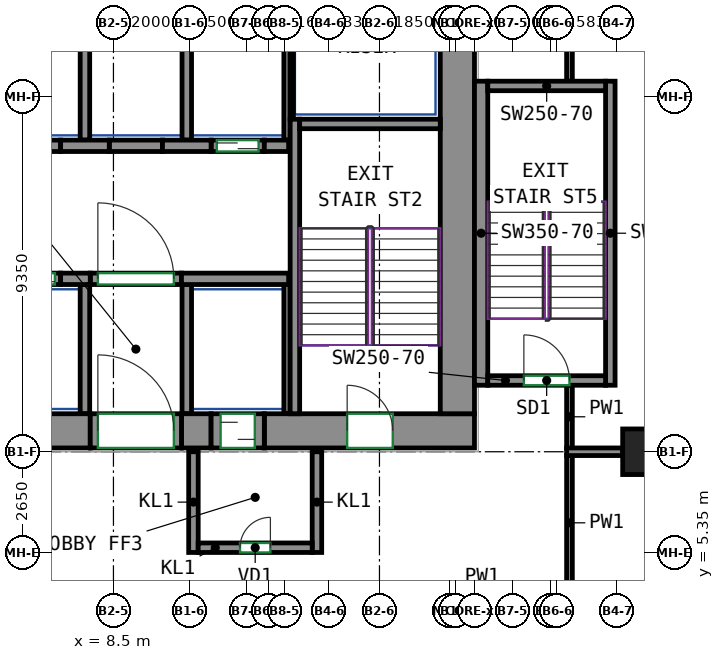
"""IFC4 building model, lengths in metres.
Left out: names, types, materials, properties, quantities, classifications, styles, units other than length and angle.
Written with IfcOpenShell. Run it as: python <this file> out.ifc"""

import sys

from ifc_helpers import new_model, si_unit, direction, frame, frame_2d, origin, origin_2d, place, context, subcontext, project, spatial, rectangle, extrude, source, transform, mapped, element, fill, save


model = new_model("IFC4")
c1 = context("Model", 3, precision=1e-05, world=origin(), true_north=direction((0.0, 1.0)))
c2 = subcontext(c1, "Body", "Model", "MODEL_VIEW")
j1 = project(units=[si_unit("LENGTHUNIT", "METRE"), si_unit("PLANEANGLEUNIT", "RADIAN")], contexts=[c1])
p1 = place(None, origin())
s1 = spatial("IfcSite", under=j1, at=p1, CompositionType="ELEMENT")
p2 = place(p1, origin())
s2 = spatial("IfcBuilding", under=s1, at=p2, CompositionType="ELEMENT")
p3 = place(p2, frame((0.0, 0.0, 104.6)))
s3 = spatial("IfcBuildingStorey", under=s2, at=p3, CompositionType="ELEMENT", Elevation=104.6)
m1 = source(origin(), c2, "Body", "SweptSolid", [
    extrude(rectangle(XDim=1.2, YDim=1.2, at=origin_2d()), origin(), (0.0, 0.0, 1.0), 3.72),
])
p4 = place(p3, frame((22.5, 8.0, 0.0), z_axis=(0.0, 0.0, 1.0), x_axis=(1.0, 0.0, 0.0)))
e1 = element("IfcColumn", 1, at=p4, inside=s3, PredefinedType="COLUMN", context=c2, shape_type="MappedRepresentation", body=[
    mapped(m1, transform((0.0, 0.0, 0.0))),
])
m2 = source(origin(), c2, "Body", "SweptSolid", [
    extrude(rectangle(XDim=14.18, YDim=0.9, at=frame_2d((7.09, 0.0))), origin(), (0.0, 0.0, 1.0), 3.72),
])
p5 = place(p3, frame((-6.29, 8.55, 0.0), z_axis=(0.0, 0.0, 1.0), x_axis=(1.0, 0.0, 0.0)))
e2 = element("IfcWall", 2, at=p5, inside=s3, PredefinedType="SHEAR", context=c2, shape_type="MappedRepresentation", body=[
    mapped(m2, transform((0.0, 0.0, 0.0))),
])
m3 = source(origin(), c2, "Body", "SweptSolid", [
    extrude(rectangle(XDim=0.78, YDim=0.9, at=frame_2d((0.39, 0.0))), origin(), (0.0, 0.0, 1.0), 3.72),
])
p6 = place(p3, frame((10.29, 8.55, 0.0), z_axis=(0.0, 0.0, 1.0), x_axis=(1.0, 0.0, 0.0)))
e3 = element("IfcWall", 3, at=p6, inside=s3, PredefinedType="SHEAR", context=c2, shape_type="MappedRepresentation", body=[
    mapped(m3, transform((0.0, 0.0, 0.0))),
])
m4 = source(origin(), c2, "Body", "SweptSolid", [
    extrude(rectangle(XDim=5.53, YDim=0.9, at=frame_2d((2.765, 0.0))), origin(), (0.0, 0.0, 1.0), 3.72),
])
p7 = place(p3, frame((12.47, 8.55, 0.0), z_axis=(0.0, 0.0, 1.0), x_axis=(1.0, 0.0, 0.0)))
e4 = element("IfcWall", 4, at=p7, inside=s3, PredefinedType="SHEAR", context=c2, shape_type="MappedRepresentation", body=[
    mapped(m4, transform((0.0, 0.0, 0.0))),
])
p8 = place(p7, frame((2.18, 0.0, 0.0)))
e5 = element("IfcOpeningElement", 5, at=p8, cuts=e4, PredefinedType="OPENING", context=c2, shape_type="SweptSolid", body=[
    extrude(rectangle(XDim=1.2, YDim=2.1, at=frame_2d((0.6, 1.05))), frame((0.0, 0.46, 0.0), z_axis=(0.0, -1.0, 0.0), x_axis=(1.0, 0.0, 0.0)), (0.0, 0.0, 1.0), 0.92),
])
m5 = source(origin(), c2, "Body", "SweptSolid", [
    extrude(rectangle(XDim=12.0, YDim=0.9, at=frame_2d((6.0, 0.0))), origin(), (0.0, 0.0, 1.0), 3.72),
])
p9 = place(p3, frame((17.55, 9.0, 0.0), z_axis=(0.0, 0.0, 1.0), x_axis=(0.0, 1.0, 0.0)))
e6 = element("IfcWall", 6, at=p9, inside=s3, PredefinedType="SHEAR", context=c2, shape_type="MappedRepresentation", body=[
    mapped(m5, transform((0.0, 0.0, 0.0))),
])
m6 = source(origin(), c2, "Body", "SweptSolid", [
    extrude(rectangle(XDim=7.75, YDim=0.25, at=frame_2d((3.875, 0.0))), origin(), (0.0, 0.0, 1.0), 3.72),
])
p10 = place(p3, frame((13.275, 9.0, 0.0), z_axis=(0.0, 0.0, 1.0), x_axis=(0.0, 1.0, 0.0)))
e7 = element("IfcWall", 7, at=p10, inside=s3, PredefinedType="SHEAR", context=c2, shape_type="MappedRepresentation", body=[
    mapped(m6, transform((0.0, 0.0, 0.0))),
])
m7 = source(origin(), c2, "Body", "SweptSolid", [
    extrude(rectangle(XDim=3.7, YDim=0.25, at=frame_2d((1.85, 0.0))), origin(), (0.0, 0.0, 1.0), 3.72),
])
p11 = place(p3, frame((13.4, 16.625, 0.0), z_axis=(0.0, 0.0, 1.0), x_axis=(1.0, 0.0, 0.0)))
e8 = element("IfcWall", 8, at=p11, inside=s3, PredefinedType="SHEAR", context=c2, shape_type="MappedRepresentation", body=[
    mapped(m7, transform((0.0, 0.0, 0.0))),
])
m8 = source(origin(), c2, "Body", "SweptSolid", [
    extrude(rectangle(XDim=8.0, YDim=0.35, at=frame_2d((4.0, 0.0))), origin(), (0.0, 0.0, 1.0), 3.72),
])
p12 = place(p3, frame((18.175, 9.75, 0.0), z_axis=(0.0, 0.0, 1.0), x_axis=(0.0, 1.0, 0.0)))
e9 = element("IfcWall", 9, at=p12, inside=s3, PredefinedType="SHEAR", context=c2, shape_type="MappedRepresentation", body=[
    mapped(m8, transform((0.0, 0.0, 0.0))),
])
m9 = source(origin(), c2, "Body", "SweptSolid", [
    extrude(rectangle(XDim=8.0, YDim=0.25, at=frame_2d((4.0, 0.0))), origin(), (0.0, 0.0, 1.0), 3.72),
])
p13 = place(p3, frame((21.575, 9.75, 0.0), z_axis=(0.0, 0.0, 1.0), x_axis=(0.0, 1.0, 0.0)))
e10 = element("IfcWall", 10, at=p13, inside=s3, PredefinedType="SHEAR", context=c2, shape_type="MappedRepresentation", body=[
    mapped(m9, transform((0.0, 0.0, 0.0))),
])
m10 = source(origin(), c2, "Body", "SweptSolid", [
    extrude(rectangle(XDim=3.1, YDim=0.25, at=frame_2d((1.55, 0.0))), origin(), (0.0, 0.0, 1.0), 3.72),
])
p14 = place(p3, frame((18.35, 9.875, 0.0), z_axis=(0.0, 0.0, 1.0), x_axis=(1.0, 0.0, 0.0)))
e11 = element("IfcWall", 11, at=p14, inside=s3, PredefinedType="SHEAR", context=c2, shape_type="MappedRepresentation", body=[
    mapped(m10, transform((0.0, 0.0, 0.0))),
])
p15 = place(p14, frame((0.95, 0.0, 0.0)))
e12 = element("IfcOpeningElement", 12, at=p15, cuts=e11, PredefinedType="OPENING", context=c2, shape_type="SweptSolid", body=[
    extrude(rectangle(XDim=1.2, YDim=2.1, at=frame_2d((0.6, 1.05))), frame((0.0, 0.135, 0.0), z_axis=(0.0, -1.0, 0.0), x_axis=(1.0, 0.0, 0.0)), (0.0, 0.0, 1.0), 0.27),
])
p16 = place(p3, frame((18.35, 17.625, 0.0), z_axis=(0.0, 0.0, 1.0), x_axis=(1.0, 0.0, 0.0)))
e13 = element("IfcWall", 13, at=p16, inside=s3, PredefinedType="SHEAR", context=c2, shape_type="MappedRepresentation", body=[
    mapped(m10, transform((0.0, 0.0, 0.0))),
])
m11 = source(origin(), c2, "Body", "SweptSolid", [
    extrude(rectangle(XDim=0.78, YDim=0.3, at=frame_2d((0.39, 0.0))), origin(), (0.0, 0.0, 1.0), 3.72),
])
p17 = place(p3, frame((7.11, 12.55, 0.0), z_axis=(0.0, 0.0, 1.0), x_axis=(1.0, 0.0, 0.0)))
e14 = element("IfcWall", 14, at=p17, inside=s3, PredefinedType="SHEAR", context=c2, shape_type="MappedRepresentation", body=[
    mapped(m11, transform((0.0, 0.0, 0.0))),
])
m12 = source(origin(), c2, "Body", "SweptSolid", [
    extrude(rectangle(XDim=2.82, YDim=0.3, at=frame_2d((1.41, 0.0))), origin(), (0.0, 0.0, 1.0), 3.72),
])
p18 = place(p3, frame((10.29, 12.55, 0.0), z_axis=(0.0, 0.0, 1.0), x_axis=(1.0, 0.0, 0.0)))
e15 = element("IfcWall", 15, at=p18, inside=s3, PredefinedType="SHEAR", context=c2, shape_type="MappedRepresentation", body=[
    mapped(m12, transform((0.0, 0.0, 0.0))),
])
m13 = source(origin(), c2, "Body", "SweptSolid", [
    extrude(rectangle(XDim=1.28, YDim=0.3, at=frame_2d((0.64, 0.0))), origin(), (0.0, 0.0, 1.0), 3.72),
])
p19 = place(p3, frame((7.11, 16.05, 0.0), z_axis=(0.0, 0.0, 1.0), x_axis=(1.0, 0.0, 0.0)))
e16 = element("IfcWall", 16, at=p19, inside=s3, PredefinedType="SHEAR", context=c2, shape_type="MappedRepresentation", body=[
    mapped(m13, transform((0.0, 0.0, 0.0))),
])
m14 = source(origin(), c2, "Body", "SweptSolid", [
    extrude(rectangle(XDim=1.28, YDim=0.3, at=frame_2d((0.64, 0.0))), origin(), (0.0, 0.0, 1.0), 3.72),
])
p20 = place(p3, frame((9.79, 16.05, 0.0), z_axis=(0.0, 0.0, 1.0), x_axis=(1.0, 0.0, 0.0)))
e17 = element("IfcWall", 17, at=p20, inside=s3, PredefinedType="SHEAR", context=c2, shape_type="MappedRepresentation", body=[
    mapped(m14, transform((0.0, 0.0, 0.0))),
])
m15 = source(origin(), c2, "Body", "SweptSolid", [
    extrude(rectangle(XDim=0.64, YDim=0.3, at=frame_2d((0.32, 0.0))), origin(), (0.0, 0.0, 1.0), 3.72),
])
p21 = place(p3, frame((12.47, 16.05, 0.0), z_axis=(0.0, 0.0, 1.0), x_axis=(1.0, 0.0, 0.0)))
e18 = element("IfcWall", 18, at=p21, inside=s3, PredefinedType="SHEAR", context=c2, shape_type="MappedRepresentation", body=[
    mapped(m15, transform((0.0, 0.0, 0.0))),
])
m16 = source(origin(), c2, "Body", "SweptSolid", [
    extrude(rectangle(XDim=1.4, YDim=0.3, at=frame_2d((0.7, 0.0))), origin(), (0.0, 0.0, 1.0), 3.72),
])
p22 = place(p3, frame((5.71, 12.55, 0.0), z_axis=(0.0, 0.0, 1.0), x_axis=(1.0, 0.0, 0.0)))
e19 = element("IfcWall", 19, at=p22, inside=s3, PredefinedType="PARTITIONING", context=c2, shape_type="MappedRepresentation", body=[
    mapped(m16, transform((0.0, 0.0, 0.0))),
])
p23 = place(p22, frame((0.15, 0.0, 0.0)))
e20 = element("IfcOpeningElement", 20, at=p23, cuts=e19, PredefinedType="OPENING", context=c2, shape_type="SweptSolid", body=[
    extrude(rectangle(XDim=1.1, YDim=2.1, at=frame_2d((0.55, 1.05))), frame((0.0, 0.16, 0.0), z_axis=(0.0, -1.0, 0.0), x_axis=(1.0, 0.0, 0.0)), (0.0, 0.0, 1.0), 0.32),
])
m17 = source(origin(), c2, "Body", "SweptSolid", [
    extrude(rectangle(XDim=1.4, YDim=0.3, at=frame_2d((0.7, 0.0))), origin(), (0.0, 0.0, 1.0), 3.72),
])
p24 = place(p3, frame((11.07, 16.05, 0.0), z_axis=(0.0, 0.0, 1.0), x_axis=(1.0, 0.0, 0.0)))
e21 = element("IfcWall", 21, at=p24, inside=s3, PredefinedType="PARTITIONING", context=c2, shape_type="MappedRepresentation", body=[
    mapped(m17, transform((0.0, 0.0, 0.0))),
])
p25 = place(p24, frame((0.15, 0.0, 0.0)))
e22 = element("IfcOpeningElement", 22, at=p25, cuts=e21, PredefinedType="OPENING", context=c2, shape_type="SweptSolid", body=[
    extrude(rectangle(XDim=1.1, YDim=2.1, at=frame_2d((0.55, 1.05))), frame((0.0, 0.16, 0.0), z_axis=(0.0, -1.0, 0.0), x_axis=(1.0, 0.0, 0.0)), (0.0, 0.0, 1.0), 0.32),
])
m18 = source(origin(), c2, "Body", "SweptSolid", [
    extrude(rectangle(XDim=2.4, YDim=0.3, at=frame_2d((1.2, 0.0))), origin(), (0.0, 0.0, 1.0), 3.72),
])
p26 = place(p3, frame((7.89, 12.55, 0.0), z_axis=(0.0, 0.0, 1.0), x_axis=(1.0, 0.0, 0.0)))
e23 = element("IfcWall", 23, at=p26, inside=s3, PredefinedType="PARTITIONING", context=c2, shape_type="MappedRepresentation", body=[
    mapped(m18, transform((0.0, 0.0, 0.0))),
])
p27 = place(p26, frame((0.2, 0.0, 0.0)))
e24 = element("IfcOpeningElement", 24, at=p27, cuts=e23, PredefinedType="OPENING", context=c2, shape_type="SweptSolid", body=[
    extrude(rectangle(XDim=2.0, YDim=2.1, at=frame_2d((1.0, 1.05))), frame((0.0, 0.16, 0.0), z_axis=(0.0, -1.0, 0.0), x_axis=(1.0, 0.0, 0.0)), (0.0, 0.0, 1.0), 0.32),
])
for number, where, z_axis, x_axis in (
    (25, (5.71, 16.05, 0.0), (0.0, 0.0, 1.0), (1.0, 0.0, 0.0)),
    (26, (8.39, 16.05, 0.0), (0.0, 0.0, 1.0), (1.0, 0.0, 0.0)),
):
    element("IfcWall", number, at=place(p3, frame(where, z_axis=z_axis, x_axis=x_axis)), inside=s3, PredefinedType="PARTITIONING", context=c2, shape_type="MappedRepresentation", body=[
        mapped(m16, transform((0.0, 0.0, 0.0))),
    ])
m19 = source(origin(), c2, "Body", "SweptSolid", [
    extrude(rectangle(XDim=2.65, YDim=0.25, at=frame_2d((1.325, 0.0))), origin(), (0.0, 0.0, 1.0), 3.72),
])
for number, where, z_axis, x_axis in (
    (27, (10.605, 5.35, 0.0), (0.0, 0.0, 1.0), (0.0, 1.0, 0.0)),
    (28, (13.855, 5.35, 0.0), (0.0, 0.0, 1.0), (0.0, 1.0, 0.0)),
):
    element("IfcWall", number, at=place(p3, frame(where, z_axis=z_axis, x_axis=x_axis)), inside=s3, PredefinedType="PARTITIONING", context=c2, shape_type="MappedRepresentation", body=[
        mapped(m19, transform((0.0, 0.0, 0.0))),
    ])
m20 = source(origin(), c2, "Body", "SweptSolid", [
    extrude(rectangle(XDim=3.0, YDim=0.25, at=frame_2d((1.5, 0.0))), origin(), (0.0, 0.0, 1.0), 3.72),
])
p28 = place(p3, frame((10.73, 5.475, 0.0), z_axis=(0.0, 0.0, 1.0), x_axis=(1.0, 0.0, 0.0)))
e29 = element("IfcWall", 29, at=p28, inside=s3, PredefinedType="PARTITIONING", context=c2, shape_type="MappedRepresentation", body=[
    mapped(m20, transform((0.0, 0.0, 0.0))),
])
p29 = place(p28, frame((1.1, 0.0, 0.0)))
e30 = element("IfcOpeningElement", 30, at=p29, cuts=e29, PredefinedType="OPENING", context=c2, shape_type="SweptSolid", body=[
    extrude(rectangle(XDim=0.8, YDim=2.0, at=frame_2d((0.4, 1.0))), frame((0.0, 0.135, 0.0), z_axis=(0.0, -1.0, 0.0), x_axis=(1.0, 0.0, 0.0)), (0.0, 0.0, 1.0), 0.27),
])
m21 = source(origin(), c2, "Body", "SweptSolid", [
    extrude(rectangle(XDim=3.275, YDim=0.165, at=frame_2d((1.638, 0.0))), origin(), (0.0, 0.0, 1.0), 3.72),
])
p30 = place(p3, frame((13.067, 16.2, 0.0), z_axis=(0.0, 0.0, 1.0), x_axis=(0.0, 1.0, 0.0)))
e31 = element("IfcWall", 31, at=p30, inside=s3, PredefinedType="PARTITIONING", context=c2, shape_type="MappedRepresentation", body=[
    mapped(m21, transform((0.0, 0.0, 0.0))),
])
m22 = source(origin(), c2, "Body", "SweptSolid", [
    extrude(rectangle(XDim=3.275, YDim=0.25, at=frame_2d((1.638, 0.0))), origin(), (0.0, 0.0, 1.0), 3.72),
])
p31 = place(p3, frame((10.43, 16.2, 0.0), z_axis=(0.0, 0.0, 1.0), x_axis=(0.0, 1.0, 0.0)))
e32 = element("IfcWall", 32, at=p31, inside=s3, PredefinedType="PARTITIONING", context=c2, shape_type="MappedRepresentation", body=[
    mapped(m22, transform((0.0, 0.0, 0.0))),
])
m23 = source(origin(), c2, "Body", "SweptSolid", [
    extrude(rectangle(XDim=2.725, YDim=0.085, at=frame_2d((1.363, 0.0))), origin(), (0.0, 0.0, 1.0), 3.72),
])
p32 = place(p3, frame((13.192, 16.75, 0.0), z_axis=(0.0, 0.0, 1.0), x_axis=(0.0, 1.0, 0.0)))
e33 = element("IfcWall", 33, at=p32, inside=s3, PredefinedType="PARTITIONING", context=c2, shape_type="MappedRepresentation", body=[
    mapped(m23, transform((0.0, 0.0, 0.0))),
])
p33 = place(p3, frame((7.75, 16.2, 0.0), z_axis=(0.0, 0.0, 1.0), x_axis=(0.0, 1.0, 0.0)))
e34 = element("IfcWall", 34, at=p33, inside=s3, PredefinedType="PARTITIONING", context=c2, shape_type="MappedRepresentation", body=[
    mapped(m22, transform((0.0, 0.0, 0.0))),
])
m24 = source(origin(), c2, "Body", "SweptSolid", [
    extrude(rectangle(XDim=3.4, YDim=0.25, at=frame_2d((1.7, 0.0))), origin(), (0.0, 0.0, 1.0), 3.72),
])
p34 = place(p3, frame((10.43, 9.0, 0.0), z_axis=(0.0, 0.0, 1.0), x_axis=(0.0, 1.0, 0.0)))
e35 = element("IfcWall", 35, at=p34, inside=s3, PredefinedType="PARTITIONING", context=c2, shape_type="MappedRepresentation", body=[
    mapped(m24, transform((0.0, 0.0, 0.0))),
])
m25 = source(origin(), c2, "Body", "SweptSolid", [
    extrude(rectangle(XDim=3.4, YDim=0.165, at=frame_2d((1.7, 0.0))), origin(), (0.0, 0.0, 1.0), 3.72),
])
p35 = place(p3, frame((13.067, 9.0, 0.0), z_axis=(0.0, 0.0, 1.0), x_axis=(0.0, 1.0, 0.0)))
e36 = element("IfcWall", 36, at=p35, inside=s3, PredefinedType="PARTITIONING", context=c2, shape_type="MappedRepresentation", body=[
    mapped(m25, transform((0.0, 0.0, 0.0))),
])
p36 = place(p3, frame((7.75, 9.0, 0.0), z_axis=(0.0, 0.0, 1.0), x_axis=(0.0, 1.0, 0.0)))
e37 = element("IfcWall", 37, at=p36, inside=s3, PredefinedType="PARTITIONING", context=c2, shape_type="MappedRepresentation", body=[
    mapped(m24, transform((0.0, 0.0, 0.0))),
])
m26 = source(origin(), c2, "Body", "SweptSolid", [
    extrude(rectangle(XDim=2.4, YDim=0.9, at=frame_2d((1.2, 0.0))), origin(), (0.0, 0.0, 1.0), 2.7),
])
p37 = place(p3, frame((7.89, 8.55, 0.0), z_axis=(0.0, 0.0, 1.0), x_axis=(1.0, 0.0, 0.0)))
e38 = element("IfcWall", 38, at=p37, inside=s3, PredefinedType="PARTITIONING", context=c2, shape_type="MappedRepresentation", body=[
    mapped(m26, transform((0.0, 0.0, 0.0))),
])
p38 = place(p37, frame((0.2, 0.0, 0.0)))
e39 = element("IfcOpeningElement", 39, at=p38, cuts=e38, PredefinedType="OPENING", context=c2, shape_type="SweptSolid", body=[
    extrude(rectangle(XDim=2.0, YDim=2.1, at=frame_2d((1.0, 1.05))), frame((0.0, 0.46, 0.0), z_axis=(0.0, -1.0, 0.0), x_axis=(1.0, 0.0, 0.0)), (0.0, 0.0, 1.0), 0.92),
])
m27 = source(origin(), c2, "Body", "SweptSolid", [
    extrude(rectangle(XDim=1.4, YDim=0.9, at=frame_2d((0.7, 0.0))), origin(), (0.0, 0.0, 1.0), 2.7),
])
p39 = place(p3, frame((11.07, 8.55, 0.0), z_axis=(0.0, 0.0, 1.0), x_axis=(1.0, 0.0, 0.0)))
e40 = element("IfcWall", 40, at=p39, inside=s3, PredefinedType="PARTITIONING", context=c2, shape_type="MappedRepresentation", body=[
    mapped(m27, transform((0.0, 0.0, 0.0))),
])
p40 = place(p39, frame((0.25, 0.0, 0.0)))
e41 = element("IfcOpeningElement", 41, at=p40, cuts=e40, PredefinedType="OPENING", context=c2, shape_type="SweptSolid", body=[
    extrude(rectangle(XDim=0.9, YDim=2.1, at=frame_2d((0.45, 1.05))), frame((0.0, 0.46, 0.0), z_axis=(0.0, -1.0, 0.0), x_axis=(1.0, 0.0, 0.0)), (0.0, 0.0, 1.0), 0.92),
])
p41 = place(p3, frame((20.5, 4.35, 0.0), z_axis=(0.0, 0.0, 1.0), x_axis=(0.0, 1.0, 0.0)))
e42 = element("IfcWall", 42, at=p41, inside=s3, PredefinedType="PARTITIONING", context=c2, shape_type="SweptSolid", body=[
    extrude(rectangle(XDim=3.56, YDim=0.15, at=frame_2d((1.78, 0.0))), origin(), (0.0, 0.0, 1.0), 3.72),
])
p42 = place(p3, frame((20.5, 17.75, 0.0), z_axis=(0.0, 0.0, 1.0), x_axis=(0.0, 1.0, 0.0)))
e43 = element("IfcWall", 43, at=p42, inside=s3, PredefinedType="PARTITIONING", context=c2, shape_type="SweptSolid", body=[
    extrude(rectangle(XDim=4.16, YDim=0.15, at=frame_2d((2.08, 0.0))), origin(), (0.0, 0.0, 1.0), 3.72),
])
p43 = place(p42, frame((1.324, 0.0, 0.0)))
e44 = element("IfcOpeningElement", 44, at=p43, cuts=e43, PredefinedType="OPENING", context=c2, shape_type="SweptSolid", body=[
    extrude(rectangle(XDim=0.9, YDim=2.1, at=frame_2d((0.45, 1.05))), frame((0.0, 0.085, 0.0), z_axis=(0.0, -1.0, 0.0), x_axis=(1.0, 0.0, 0.0)), (0.0, 0.0, 1.0), 0.17),
])
p44 = place(p3, frame((20.5, 8.09, 0.0), z_axis=(0.0, 0.0, 1.0), x_axis=(0.0, 1.0, 0.0)))
e45 = element("IfcWall", 45, at=p44, inside=s3, PredefinedType="PARTITIONING", context=c2, shape_type="SweptSolid", body=[
    extrude(rectangle(XDim=1.66, YDim=0.15, at=frame_2d((0.83, 0.0))), origin(), (0.0, 0.0, 1.0), 3.72),
])
p45 = place(p3, frame((20.426, 8.0, 0.0), z_axis=(0.0, 0.0, 1.0), x_axis=(1.0, 0.0, 0.0)))
e46 = element("IfcWall", 46, at=p45, inside=s3, PredefinedType="PARTITIONING", context=c2, shape_type="SweptSolid", body=[
    extrude(rectangle(XDim=1.474, YDim=0.2, at=frame_2d((0.737, 0.0))), origin(), (0.0, 0.0, 1.0), 3.72),
])
p46 = place(p27, origin())
e47 = element("IfcDoor", 47, at=p46, inside=s3, OperationType="DOUBLE_DOOR_SINGLE_SWING", PredefinedType="DOOR", context=c2, shape_type="SweptSolid", body=[
    extrude(rectangle(XDim=2.0, YDim=2.1, at=frame_2d((1.0, 1.05))), frame((0.0, 0.025, 0.0), z_axis=(0.0, -1.0, 0.0), x_axis=(1.0, 0.0, 0.0)), (0.0, 0.0, 1.0), 0.05),
])
fill(e24, e47)
p47 = place(p38, origin())
e48 = element("IfcDoor", 48, at=p47, inside=s3, OperationType="DOUBLE_DOOR_SINGLE_SWING", PredefinedType="DOOR", context=c2, shape_type="SweptSolid", body=[
    extrude(rectangle(XDim=2.0, YDim=2.1, at=frame_2d((1.0, 1.05))), frame((0.0, 0.355, 0.0), z_axis=(0.0, -1.0, 0.0), x_axis=(1.0, 0.0, 0.0)), (0.0, 0.0, 1.0), 0.05),
])
fill(e39, e48)
p48 = place(p29, origin())
e49 = element("IfcDoor", 49, at=p48, inside=s3, OperationType="SINGLE_SWING_RIGHT", PredefinedType="DOOR", context=c2, shape_type="SweptSolid", body=[
    extrude(rectangle(XDim=0.8, YDim=2.0, at=frame_2d((0.4, 1.0))), frame((0.0, 0.025, 0.0), z_axis=(0.0, -1.0, 0.0), x_axis=(1.0, 0.0, 0.0)), (0.0, 0.0, 1.0), 0.05),
])
fill(e30, e49)
p49 = place(p40, origin())
e50 = element("IfcDoor", 50, at=p49, inside=s3, OperationType="SLIDING_TO_LEFT", PredefinedType="DOOR", context=c2, shape_type="SweptSolid", body=[
    extrude(rectangle(XDim=0.9, YDim=2.1, at=frame_2d((0.45, 1.05))), frame((0.0, 0.355, 0.0), z_axis=(0.0, -1.0, 0.0), x_axis=(1.0, 0.0, 0.0)), (0.0, 0.0, 1.0), 0.05),
])
fill(e41, e50)
p50 = place(p23, origin())
e51 = element("IfcDoor", 51, at=p50, inside=s3, OperationType="DOUBLE_DOOR_SLIDING", PredefinedType="DOOR", context=c2, shape_type="SweptSolid", body=[
    extrude(rectangle(XDim=1.1, YDim=2.1, at=frame_2d((0.55, 1.05))), frame((0.0, 0.025, 0.0), z_axis=(0.0, -1.0, 0.0), x_axis=(1.0, 0.0, 0.0)), (0.0, 0.0, 1.0), 0.05),
])
fill(e20, e51)
p51 = place(p25, origin())
e52 = element("IfcDoor", 52, at=p51, inside=s3, OperationType="DOUBLE_DOOR_SLIDING", PredefinedType="DOOR", context=c2, shape_type="SweptSolid", body=[
    extrude(rectangle(XDim=1.1, YDim=2.1, at=frame_2d((0.55, 1.05))), frame((0.0, 0.025, 0.0), z_axis=(0.0, -1.0, 0.0), x_axis=(1.0, 0.0, 0.0)), (0.0, 0.0, 1.0), 0.05),
])
fill(e22, e52)
p52 = place(p8, origin())
e53 = element("IfcDoor", 53, at=p52, inside=s3, OperationType="DOUBLE_DOOR_SINGLE_SWING", PredefinedType="DOOR", context=c2, shape_type="SweptSolid", body=[
    extrude(rectangle(XDim=1.2, YDim=2.1, at=frame_2d((0.6, 1.05))), frame((0.0, 0.355, 0.0), z_axis=(0.0, -1.0, 0.0), x_axis=(1.0, 0.0, 0.0)), (0.0, 0.0, 1.0), 0.05),
])
fill(e5, e53)
p53 = place(p15, origin())
e54 = element("IfcDoor", 54, at=p53, inside=s3, OperationType="DOUBLE_DOOR_SINGLE_SWING", PredefinedType="DOOR", context=c2, shape_type="SweptSolid", body=[
    extrude(rectangle(XDim=1.2, YDim=2.1, at=frame_2d((0.6, 1.05))), frame((0.0, 0.025, 0.0), z_axis=(0.0, -1.0, 0.0), x_axis=(1.0, 0.0, 0.0)), (0.0, 0.0, 1.0), 0.05),
])
fill(e12, e54)
save(model, sys.argv[1])
